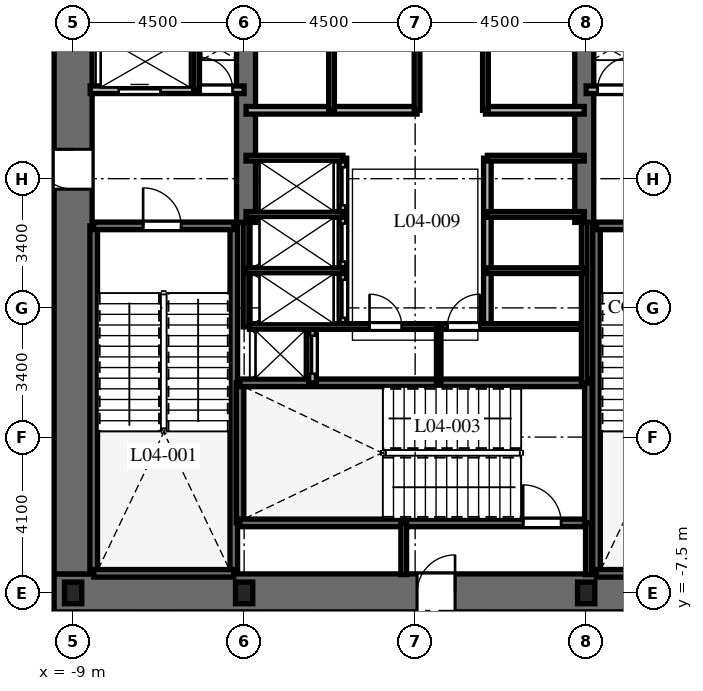
"""IFC4 building model, lengths in metres.
Left out: names, types, materials, properties, quantities, classifications, styles, units other than length and angle.
Written with IfcOpenShell. Run it as: python <this file> out.ifc"""

import sys

from ifc_helpers import new_model, si_unit, direction, frame, frame_2d, origin, origin_2d, place, context, subcontext, project, spatial, rectangle, i_section, extrude, element, fill, save


model = new_model("IFC4")
c1 = context("Model", 3, precision=1e-05, world=origin(), true_north=direction((0.0, 1.0)))
c2 = subcontext(c1, "Body", "Model", "MODEL_VIEW")
j1 = project(units=[si_unit("LENGTHUNIT", "METRE"), si_unit("PLANEANGLEUNIT", "RADIAN")], contexts=[c1])
p1 = place(None, origin())
s1 = spatial("IfcSite", under=j1, at=p1, CompositionType="ELEMENT")
p2 = place(p1, origin())
s2 = spatial("IfcBuilding", under=s1, at=p2, CompositionType="ELEMENT")
p3 = place(p2, frame((0.0, 0.0, 23.4)))
s3 = spatial("IfcBuildingStorey", under=s2, at=p3, CompositionType="ELEMENT", Elevation=23.4)
p4 = place(p3, frame((-9.5, -7.5, 0.0), z_axis=(0.0, 0.0, 1.0), x_axis=(1.0, 0.0, 0.0)))
e1 = element("IfcWall", 1, at=p4, inside=s3, PredefinedType="SHEAR", context=c2, shape_type="SweptSolid", body=[
    extrude(rectangle(XDim=19.0, YDim=1.0, at=frame_2d((9.5, 0.0))), origin(), (0.0, 0.0, 1.0), 4.8),
])
p5 = place(p4, frame((9.55, 0.0, 0.0)))
e2 = element("IfcOpeningElement", 2, at=p5, cuts=e1, PredefinedType="OPENING", context=c2, shape_type="SweptSolid", body=[
    extrude(rectangle(XDim=1.0, YDim=2.15, at=frame_2d((0.5, 1.075))), frame((0.0, 0.51, 0.0), z_axis=(0.0, -1.0, 0.0), x_axis=(1.0, 0.0, 0.0)), (0.0, 0.0, 1.0), 1.02),
])
p6 = place(p3, frame((-9.0, -7.0, 0.0), z_axis=(0.0, 0.0, 1.0), x_axis=(0.0, 1.0, 0.0)))
e3 = element("IfcWall", 3, at=p6, inside=s3, PredefinedType="SHEAR", context=c2, shape_type="SweptSolid", body=[
    extrude(rectangle(XDim=14.0, YDim=1.0, at=frame_2d((7.0, 0.0))), origin(), (0.0, 0.0, 1.0), 4.8),
])
p7 = place(p6, frame((10.125, 0.0, 0.0)))
e4 = element("IfcOpeningElement", 4, at=p7, cuts=e3, PredefinedType="OPENING", context=c2, shape_type="SweptSolid", body=[
    extrude(rectangle(XDim=1.05, YDim=2.15, at=frame_2d((0.525, 1.075))), frame((0.0, 0.51, 0.0), z_axis=(0.0, -1.0, 0.0), x_axis=(1.0, 0.0, 0.0)), (0.0, 0.0, 1.0), 1.02),
])
for number, where, z_axis, x_axis in (
    (5, (-4.45, 2.25, 0.0), (0.0, 0.0, 1.0), (0.0, 1.0, 0.0)),
    (6, (4.45, 2.25, 0.0), (0.0, 0.0, 1.0), (0.0, 1.0, 0.0)),
):
    element("IfcWall", number, at=place(p3, frame(where, z_axis=z_axis, x_axis=x_axis)), inside=s3, PredefinedType="SHEAR", context=c2, shape_type="SweptSolid", body=[
        extrude(rectangle(XDim=4.75, YDim=0.5, at=frame_2d((2.375, 0.0))), origin(), (0.0, 0.0, 1.0), 4.8),
    ])
for number, where, z_axis, x_axis in (
    (7, (-8.458, -6.985, 0.0), (0.0, 0.0, 1.0), (0.0, 1.0, 0.0)),
    (8, (-4.772, -6.985, 0.0), (0.0, 0.0, 1.0), (0.0, 1.0, 0.0)),
):
    element("IfcWall", number, at=place(p3, frame(where, z_axis=z_axis, x_axis=x_axis)), inside=s3, PredefinedType="SHEAR", context=c2, shape_type="SweptSolid", body=[
        extrude(rectangle(XDim=9.143, YDim=0.2, at=frame_2d((4.572, 0.0))), origin(), (0.0, 0.0, 1.0), 4.8),
    ])
p8 = place(p3, frame((-8.458, -6.985, 0.0), z_axis=(0.0, 0.0, 1.0), x_axis=(1.0, 0.0, 0.0)))
e9 = element("IfcWall", 9, at=p8, inside=s3, PredefinedType="SHEAR", context=c2, shape_type="SweptSolid", body=[
    extrude(rectangle(XDim=3.686, YDim=0.2, at=frame_2d((1.843, 0.0))), origin(), (0.0, 0.0, 1.0), 4.8),
])
p9 = place(p3, frame((-8.458, 2.158, 0.0), z_axis=(0.0, 0.0, 1.0), x_axis=(1.0, 0.0, 0.0)))
e10 = element("IfcWall", 10, at=p9, inside=s3, PredefinedType="SHEAR", context=c2, shape_type="SweptSolid", body=[
    extrude(rectangle(XDim=3.686, YDim=0.2, at=frame_2d((1.843, 0.0))), origin(), (0.0, 0.0, 1.0), 4.8),
])
p10 = place(p9, frame((1.3, 0.0, 0.0)))
e11 = element("IfcOpeningElement", 11, at=p10, cuts=e10, PredefinedType="OPENING", context=c2, shape_type="SweptSolid", body=[
    extrude(rectangle(XDim=1.0, YDim=2.15, at=frame_2d((0.5, 1.075))), frame((0.0, 0.11, 0.0), z_axis=(0.0, -1.0, 0.0), x_axis=(1.0, 0.0, 0.0)), (0.0, 0.0, 1.0), 0.22),
])
p11 = place(p3, frame((4.772, -6.985, 0.0), z_axis=(0.0, 0.0, 1.0), x_axis=(0.0, 1.0, 0.0)))
e12 = element("IfcWall", 12, at=p11, inside=s3, PredefinedType="SHEAR", context=c2, shape_type="SweptSolid", body=[
    extrude(rectangle(XDim=9.143, YDim=0.2, at=frame_2d((4.572, 0.0))), origin(), (0.0, 0.0, 1.0), 4.8),
])
p12 = place(p3, frame((4.772, -6.985, 0.0), z_axis=(0.0, 0.0, 1.0), x_axis=(1.0, 0.0, 0.0)))
e13 = element("IfcWall", 13, at=p12, inside=s3, PredefinedType="SHEAR", context=c2, shape_type="SweptSolid", body=[
    extrude(rectangle(XDim=3.686, YDim=0.2, at=frame_2d((1.843, 0.0))), origin(), (0.0, 0.0, 1.0), 4.8),
])
p13 = place(p3, frame((4.772, 2.158, 0.0), z_axis=(0.0, 0.0, 1.0), x_axis=(1.0, 0.0, 0.0)))
e14 = element("IfcWall", 14, at=p13, inside=s3, PredefinedType="SHEAR", context=c2, shape_type="SweptSolid", body=[
    extrude(rectangle(XDim=3.686, YDim=0.2, at=frame_2d((1.843, 0.0))), origin(), (0.0, 0.0, 1.0), 4.8),
])
p14 = place(p13, frame((1.35, 0.0, 0.0)))
e15 = element("IfcOpeningElement", 15, at=p14, cuts=e14, PredefinedType="OPENING", context=c2, shape_type="SweptSolid", body=[
    extrude(rectangle(XDim=1.0, YDim=2.15, at=frame_2d((0.5, 1.075))), frame((0.0, 0.11, 0.0), z_axis=(0.0, -1.0, 0.0), x_axis=(1.0, 0.0, 0.0)), (0.0, 0.0, 1.0), 0.22),
])
p15 = place(p3, frame((-4.608, -5.658, 0.0), z_axis=(0.0, 0.0, 1.0), x_axis=(0.0, 1.0, 0.0)))
e16 = element("IfcWall", 16, at=p15, inside=s3, PredefinedType="SHEAR", context=c2, shape_type="SweptSolid", body=[
    extrude(rectangle(XDim=3.686, YDim=0.2, at=frame_2d((1.843, 0.0))), origin(), (0.0, 0.0, 1.0), 4.8),
])
p16 = place(p3, frame((-4.608, -5.658, 0.0), z_axis=(0.0, 0.0, 1.0), x_axis=(1.0, 0.0, 0.0)))
e17 = element("IfcWall", 17, at=p16, inside=s3, PredefinedType="SHEAR", context=c2, shape_type="SweptSolid", body=[
    extrude(rectangle(XDim=9.166, YDim=0.2, at=frame_2d((4.583, 0.0))), origin(), (0.0, 0.0, 1.0), 4.8),
])
p17 = place(p16, frame((7.45, 0.0, 0.0)))
e18 = element("IfcOpeningElement", 18, at=p17, cuts=e17, PredefinedType="OPENING", context=c2, shape_type="SweptSolid", body=[
    extrude(rectangle(XDim=1.0, YDim=2.15, at=frame_2d((0.5, 1.075))), frame((0.0, 0.11, 0.0), z_axis=(0.0, -1.0, 0.0), x_axis=(1.0, 0.0, 0.0)), (0.0, 0.0, 1.0), 0.22),
])
p18 = place(p3, frame((-4.608, -1.972, 0.0), z_axis=(0.0, 0.0, 1.0), x_axis=(1.0, 0.0, 0.0)))
e19 = element("IfcWall", 19, at=p18, inside=s3, PredefinedType="SHEAR", context=c2, shape_type="SweptSolid", body=[
    extrude(rectangle(XDim=9.166, YDim=0.2, at=frame_2d((4.583, 0.0))), origin(), (0.0, 0.0, 1.0), 4.8),
])
p19 = place(p3, frame((4.558, -5.658, 0.0), z_axis=(0.0, 0.0, 1.0), x_axis=(0.0, 1.0, 0.0)))
e20 = element("IfcWall", 20, at=p19, inside=s3, PredefinedType="SHEAR", context=c2, shape_type="SweptSolid", body=[
    extrude(rectangle(XDim=3.686, YDim=0.2, at=frame_2d((1.843, 0.0))), origin(), (0.0, 0.0, 1.0), 4.8),
])
for number, where, z_axis, x_axis in (
    (21, (-9.0, -7.5, 0.0), (0.0, 0.0, 1.0), (1.0, 0.0, 0.0)),
    (22, (-4.5, -7.5, 0.0), (0.0, 0.0, 1.0), (1.0, 0.0, 0.0)),
    (23, (4.5, -7.5, 0.0), (0.0, 0.0, 1.0), (1.0, 0.0, 0.0)),
):
    element("IfcColumn", number, at=place(p3, frame(where, z_axis=z_axis, x_axis=x_axis)), inside=s3, PredefinedType="COLUMN", context=c2, shape_type="SweptSolid", body=[
        extrude(i_section(OverallWidth=0.454, OverallDepth=0.569, WebThickness=0.078, FlangeThickness=0.125, at=origin_2d()), origin(), (0.0, 0.0, 1.0), 4.8),
    ])
for number, where, z_axis, x_axis in (
    (24, (-0.3, -7.02, 0.0), (0.0, 0.0, 1.0), (0.0, 1.0, 0.0)),
    (25, (4.558, -7.02, 0.0), (0.0, 0.0, 1.0), (0.0, 1.0, 0.0)),
):
    element("IfcWall", number, at=place(p3, frame(where, z_axis=z_axis, x_axis=x_axis)), inside=s3, PredefinedType="PARTITIONING", context=c2, shape_type="SweptSolid", body=[
        extrude(rectangle(XDim=1.362, YDim=0.15, at=frame_2d((0.681, 0.0))), origin(), (0.0, 0.0, 1.0), 4.48),
    ])
p20 = place(p3, frame((-8.55, 5.74, 0.0), z_axis=(0.0, 0.0, 1.0), x_axis=(1.0, 0.0, 0.0)))
e26 = element("IfcWall", 26, at=p20, inside=s3, PredefinedType="PARTITIONING", context=c2, shape_type="SweptSolid", body=[
    extrude(rectangle(XDim=4.05, YDim=0.2, at=frame_2d((2.025, 0.0))), origin(), (0.0, 0.0, 1.0), 4.48),
])
p21 = place(p20, frame((0.75, 0.0, 0.0)))
e27 = element("IfcOpeningElement", 27, at=p21, cuts=e26, PredefinedType="OPENING", context=c2, shape_type="SweptSolid", body=[
    extrude(rectangle(XDim=1.1, YDim=2.2, at=frame_2d((0.55, 1.1))), frame((0.0, 0.11, 0.0), z_axis=(0.0, -1.0, 0.0), x_axis=(1.0, 0.0, 0.0)), (0.0, 0.0, 1.0), 0.22),
])
p22 = place(p20, frame((2.9, 0.0, 0.0)))
e28 = element("IfcOpeningElement", 28, at=p22, cuts=e26, PredefinedType="OPENING", context=c2, shape_type="SweptSolid", body=[
    extrude(rectangle(XDim=0.85, YDim=2.03, at=frame_2d((0.425, 1.015))), frame((0.0, 0.11, 0.0), z_axis=(0.0, -1.0, 0.0), x_axis=(1.0, 0.0, 0.0)), (0.0, 0.0, 1.0), 0.22),
])
p23 = place(p3, frame((-5.75, 5.74, 0.0), z_axis=(0.0, 0.0, 1.0), x_axis=(0.0, 1.0, 0.0)))
e29 = element("IfcWall", 29, at=p23, inside=s3, PredefinedType="PARTITIONING", context=c2, shape_type="SweptSolid", body=[
    extrude(rectangle(XDim=1.41, YDim=0.15, at=frame_2d((0.705, 0.0))), origin(), (0.0, 0.0, 1.0), 4.48),
])
p24 = place(p3, frame((4.5, 5.74, 0.0), z_axis=(0.0, 0.0, 1.0), x_axis=(1.0, 0.0, 0.0)))
e30 = element("IfcWall", 30, at=p24, inside=s3, PredefinedType="PARTITIONING", context=c2, shape_type="SweptSolid", body=[
    extrude(rectangle(XDim=4.05, YDim=0.2, at=frame_2d((2.025, 0.0))), origin(), (0.0, 0.0, 1.0), 4.48),
])
p25 = place(p24, frame((0.3, 0.0, 0.0)))
e31 = element("IfcOpeningElement", 31, at=p25, cuts=e30, PredefinedType="OPENING", context=c2, shape_type="SweptSolid", body=[
    extrude(rectangle(XDim=0.85, YDim=2.03, at=frame_2d((0.425, 1.015))), frame((0.0, 0.11, 0.0), z_axis=(0.0, -1.0, 0.0), x_axis=(1.0, 0.0, 0.0)), (0.0, 0.0, 1.0), 0.22),
])
p26 = place(p24, frame((2.15, 0.0, 0.0)))
e32 = element("IfcOpeningElement", 32, at=p26, cuts=e30, PredefinedType="OPENING", context=c2, shape_type="SweptSolid", body=[
    extrude(rectangle(XDim=1.1, YDim=2.2, at=frame_2d((0.55, 1.1))), frame((0.0, 0.11, 0.0), z_axis=(0.0, -1.0, 0.0), x_axis=(1.0, 0.0, 0.0)), (0.0, 0.0, 1.0), 0.22),
])
p27 = place(p3, frame((-2.7, -1.972, 0.0), z_axis=(0.0, 0.0, 1.0), x_axis=(0.0, 1.0, 0.0)))
e33 = element("IfcWall", 33, at=p27, inside=s3, PredefinedType="PARTITIONING", context=c2, shape_type="SweptSolid", body=[
    extrude(rectangle(XDim=1.472, YDim=0.2, at=frame_2d((0.736, 0.0))), origin(), (0.0, 0.0, 1.0), 4.48),
])
p28 = place(p27, frame((0.24, 0.0, 0.0)))
e34 = element("IfcOpeningElement", 34, at=p28, cuts=e33, PredefinedType="OPENING", context=c2, shape_type="SweptSolid", body=[
    extrude(rectangle(XDim=1.0, YDim=2.2, at=frame_2d((0.5, 1.1))), frame((0.0, 0.11, 0.0), z_axis=(0.0, -1.0, 0.0), x_axis=(1.0, 0.0, 0.0)), (0.0, 0.0, 1.0), 0.22),
])
p29 = place(p3, frame((-4.45, 5.2, 0.0), z_axis=(0.0, 0.0, 1.0), x_axis=(1.0, 0.0, 0.0)))
e35 = element("IfcWall", 35, at=p29, inside=s3, PredefinedType="PARTITIONING", context=c2, shape_type="SweptSolid", body=[
    extrude(rectangle(XDim=4.5, YDim=0.2, at=frame_2d((2.25, 0.0))), origin(), (0.0, 0.0, 1.0), 4.48),
])
p30 = place(p3, frame((1.85, 5.2, 0.0), z_axis=(0.0, 0.0, 1.0), x_axis=(1.0, 0.0, 0.0)))
e36 = element("IfcWall", 36, at=p30, inside=s3, PredefinedType="PARTITIONING", context=c2, shape_type="SweptSolid", body=[
    extrude(rectangle(XDim=2.6, YDim=0.2, at=frame_2d((1.3, 0.0))), origin(), (0.0, 0.0, 1.0), 4.48),
])
p31 = place(p3, frame((-2.2, 5.2, 0.0), z_axis=(0.0, 0.0, 1.0), x_axis=(0.0, 1.0, 0.0)))
e37 = element("IfcWall", 37, at=p31, inside=s3, PredefinedType="PARTITIONING", context=c2, shape_type="SweptSolid", body=[
    extrude(rectangle(XDim=1.85, YDim=0.15, at=frame_2d((0.925, 0.0))), origin(), (0.0, 0.0, 1.0), 4.48),
])
for number, where, z_axis, x_axis in (
    (38, (0.05, 5.2, 0.0), (0.0, 0.0, 1.0), (0.0, 1.0, 0.0)),
    (39, (1.85, 5.2, 0.0), (0.0, 0.0, 1.0), (0.0, 1.0, 0.0)),
):
    element("IfcWall", number, at=place(p3, frame(where, z_axis=z_axis, x_axis=x_axis)), inside=s3, PredefinedType="PARTITIONING", context=c2, shape_type="SweptSolid", body=[
        extrude(rectangle(XDim=1.95, YDim=0.15, at=frame_2d((0.975, 0.0))), origin(), (0.0, 0.0, 1.0), 4.48),
    ])
p32 = place(p3, frame((-4.45, -0.5, 0.0), z_axis=(0.0, 0.0, 1.0), x_axis=(0.0, 1.0, 0.0)))
e40 = element("IfcWall", 40, at=p32, inside=s3, PredefinedType="PARTITIONING", context=c2, shape_type="SweptSolid", body=[
    extrude(rectangle(XDim=2.75, YDim=0.15, at=frame_2d((1.375, 0.0))), origin(), (0.0, 0.0, 1.0), 4.48),
])
p33 = place(p3, frame((4.45, -1.972, 0.0), z_axis=(0.0, 0.0, 1.0), x_axis=(0.0, 1.0, 0.0)))
e41 = element("IfcWall", 41, at=p33, inside=s3, PredefinedType="PARTITIONING", context=c2, shape_type="SweptSolid", body=[
    extrude(rectangle(XDim=4.222, YDim=0.15, at=frame_2d((2.111, 0.0))), origin(), (0.0, 0.0, 1.0), 4.48),
])
p34 = place(p3, frame((-1.9, -0.5, 0.0), z_axis=(0.0, 0.0, 1.0), x_axis=(0.0, 1.0, 0.0)))
e42 = element("IfcWall", 42, at=p34, inside=s3, PredefinedType="PARTITIONING", context=c2, shape_type="SweptSolid", body=[
    extrude(rectangle(XDim=4.44, YDim=0.2, at=frame_2d((2.22, 0.0))), origin(), (0.0, 0.0, 1.0), 4.48),
])
p35 = place(p34, frame((0.24, 0.0, 0.0)))
e43 = element("IfcOpeningElement", 43, at=p35, cuts=e42, PredefinedType="OPENING", context=c2, shape_type="SweptSolid", body=[
    extrude(rectangle(XDim=1.0, YDim=2.2, at=frame_2d((0.5, 1.1))), frame((0.0, 0.11, 0.0), z_axis=(0.0, -1.0, 0.0), x_axis=(1.0, 0.0, 0.0)), (0.0, 0.0, 1.0), 0.22),
])
p36 = place(p34, frame((1.72, 0.0, 0.0)))
e44 = element("IfcOpeningElement", 44, at=p36, cuts=e42, PredefinedType="OPENING", context=c2, shape_type="SweptSolid", body=[
    extrude(rectangle(XDim=1.0, YDim=2.2, at=frame_2d((0.5, 1.1))), frame((0.0, 0.11, 0.0), z_axis=(0.0, -1.0, 0.0), x_axis=(1.0, 0.0, 0.0)), (0.0, 0.0, 1.0), 0.22),
])
p37 = place(p34, frame((3.2, 0.0, 0.0)))
e45 = element("IfcOpeningElement", 45, at=p37, cuts=e42, PredefinedType="OPENING", context=c2, shape_type="SweptSolid", body=[
    extrude(rectangle(XDim=1.0, YDim=2.2, at=frame_2d((0.5, 1.1))), frame((0.0, 0.11, 0.0), z_axis=(0.0, -1.0, 0.0), x_axis=(1.0, 0.0, 0.0)), (0.0, 0.0, 1.0), 0.22),
])
for number, where, z_axis, x_axis in (
    (46, (-4.45, 3.94, 0.0), (0.0, 0.0, 1.0), (1.0, 0.0, 0.0)),
    (47, (-4.45, 0.98, 0.0), (0.0, 0.0, 1.0), (1.0, 0.0, 0.0)),
    (48, (-4.45, 2.46, 0.0), (0.0, 0.0, 1.0), (1.0, 0.0, 0.0)),
):
    element("IfcWall", number, at=place(p3, frame(where, z_axis=z_axis, x_axis=x_axis)), inside=s3, PredefinedType="PARTITIONING", context=c2, shape_type="SweptSolid", body=[
        extrude(rectangle(XDim=2.55, YDim=0.15, at=frame_2d((1.275, 0.0))), origin(), (0.0, 0.0, 1.0), 4.48),
    ])
p38 = place(p3, frame((1.9, -0.5, 0.0), z_axis=(0.0, 0.0, 1.0), x_axis=(0.0, 1.0, 0.0)))
e49 = element("IfcWall", 49, at=p38, inside=s3, PredefinedType="PARTITIONING", context=c2, shape_type="SweptSolid", body=[
    extrude(rectangle(XDim=4.44, YDim=0.2, at=frame_2d((2.22, 0.0))), origin(), (0.0, 0.0, 1.0), 4.48),
])
for number, where, z_axis, x_axis in (
    (50, (1.9, 3.94, 0.0), (0.0, 0.0, 1.0), (1.0, 0.0, 0.0)),
    (51, (1.9, 0.98, 0.0), (0.0, 0.0, 1.0), (1.0, 0.0, 0.0)),
    (52, (1.9, 2.46, 0.0), (0.0, 0.0, 1.0), (1.0, 0.0, 0.0)),
):
    element("IfcWall", number, at=place(p3, frame(where, z_axis=z_axis, x_axis=x_axis)), inside=s3, PredefinedType="PARTITIONING", context=c2, shape_type="SweptSolid", body=[
        extrude(rectangle(XDim=2.55, YDim=0.15, at=frame_2d((1.275, 0.0))), origin(), (0.0, 0.0, 1.0), 4.48),
    ])
p39 = place(p3, frame((-4.36, -0.49, 0.0), z_axis=(0.0, 0.0, 1.0), x_axis=(1.0, 0.0, 0.0)))
e53 = element("IfcWall", 53, at=p39, inside=s3, PredefinedType="PARTITIONING", context=c2, shape_type="SweptSolid", body=[
    extrude(rectangle(XDim=8.72, YDim=0.15, at=frame_2d((4.36, 0.0))), origin(), (0.0, 0.0, 1.0), 4.48),
])
p40 = place(p39, frame((3.16, 0.0, 0.0)))
e54 = element("IfcOpeningElement", 54, at=p40, cuts=e53, PredefinedType="OPENING", context=c2, shape_type="SweptSolid", body=[
    extrude(rectangle(XDim=0.85, YDim=2.03, at=frame_2d((0.425, 1.015))), frame((0.0, 0.085, 0.0), z_axis=(0.0, -1.0, 0.0), x_axis=(1.0, 0.0, 0.0)), (0.0, 0.0, 1.0), 0.17),
])
p41 = place(p39, frame((5.21, 0.0, 0.0)))
e55 = element("IfcOpeningElement", 55, at=p41, cuts=e53, PredefinedType="OPENING", context=c2, shape_type="SweptSolid", body=[
    extrude(rectangle(XDim=0.85, YDim=2.03, at=frame_2d((0.425, 1.015))), frame((0.0, 0.085, 0.0), z_axis=(0.0, -1.0, 0.0), x_axis=(1.0, 0.0, 0.0)), (0.0, 0.0, 1.0), 0.17),
])
p42 = place(p3, frame((0.62, -1.972, 0.0), z_axis=(0.0, 0.0, 1.0), x_axis=(0.0, 1.0, 0.0)))
e56 = element("IfcWall", 56, at=p42, inside=s3, PredefinedType="PARTITIONING", context=c2, shape_type="SweptSolid", body=[
    extrude(rectangle(XDim=1.472, YDim=0.12, at=frame_2d((0.736, 0.0))), origin(), (0.0, 0.0, 1.0), 4.48),
])
p43 = place(p10, origin())
e57 = element("IfcDoor", 57, at=p43, inside=s3, OperationType="SINGLE_SWING_LEFT", PredefinedType="DOOR", context=c2, shape_type="SweptSolid", body=[
    extrude(rectangle(XDim=1.0, YDim=2.15, at=frame_2d((0.5, 1.075))), frame((0.0, 0.025, 0.0), z_axis=(0.0, -1.0, 0.0), x_axis=(1.0, 0.0, 0.0)), (0.0, 0.0, 1.0), 0.05),
])
fill(e11, e57)
p44 = place(p17, origin())
e58 = element("IfcDoor", 58, at=p44, inside=s3, OperationType="SINGLE_SWING_LEFT", PredefinedType="DOOR", context=c2, shape_type="SweptSolid", body=[
    extrude(rectangle(XDim=1.0, YDim=2.15, at=frame_2d((0.5, 1.075))), frame((0.0, 0.025, 0.0), z_axis=(0.0, -1.0, 0.0), x_axis=(1.0, 0.0, 0.0)), (0.0, 0.0, 1.0), 0.05),
])
fill(e18, e58)
p45 = place(p5, origin())
e59 = element("IfcDoor", 59, at=p45, inside=s3, OperationType="SINGLE_SWING_RIGHT", PredefinedType="DOOR", context=c2, shape_type="SweptSolid", body=[
    extrude(rectangle(XDim=1.0, YDim=2.15, at=frame_2d((0.5, 1.075))), frame((0.0, 0.025, 0.0), z_axis=(0.0, -1.0, 0.0), x_axis=(1.0, 0.0, 0.0)), (0.0, 0.0, 1.0), 0.05),
])
fill(e2, e59)
p46 = place(p7, origin())
e60 = element("IfcDoor", 60, at=p46, inside=s3, OperationType="SINGLE_SWING_RIGHT", PredefinedType="DOOR", context=c2, shape_type="SweptSolid", body=[
    extrude(rectangle(XDim=1.05, YDim=2.15, at=frame_2d((0.525, 1.075))), frame((0.0, 0.025, 0.0), z_axis=(0.0, -1.0, 0.0), x_axis=(1.0, 0.0, 0.0)), (0.0, 0.0, 1.0), 0.05),
])
fill(e4, e60)
p47 = place(p21, origin())
e61 = element("IfcDoor", 61, at=p47, inside=s3, OperationType="SLIDING_TO_LEFT", PredefinedType="DOOR", context=c2, shape_type="SweptSolid", body=[
    extrude(rectangle(XDim=1.1, YDim=2.2, at=frame_2d((0.55, 1.1))), frame((0.0, 0.025, 0.0), z_axis=(0.0, -1.0, 0.0), x_axis=(1.0, 0.0, 0.0)), (0.0, 0.0, 1.0), 0.05),
])
fill(e27, e61)
p48 = place(p22, origin())
e62 = element("IfcDoor", 62, at=p48, inside=s3, OperationType="SINGLE_SWING_LEFT", PredefinedType="DOOR", context=c2, shape_type="SweptSolid", body=[
    extrude(rectangle(XDim=0.85, YDim=2.03, at=frame_2d((0.425, 1.015))), frame((0.0, 0.025, 0.0), z_axis=(0.0, -1.0, 0.0), x_axis=(1.0, 0.0, 0.0)), (0.0, 0.0, 1.0), 0.05),
])
fill(e28, e62)
p49 = place(p25, origin())
e63 = element("IfcDoor", 63, at=p49, inside=s3, OperationType="SINGLE_SWING_RIGHT", PredefinedType="DOOR", context=c2, shape_type="SweptSolid", body=[
    extrude(rectangle(XDim=0.85, YDim=2.03, at=frame_2d((0.425, 1.015))), frame((0.0, 0.025, 0.0), z_axis=(0.0, -1.0, 0.0), x_axis=(1.0, 0.0, 0.0)), (0.0, 0.0, 1.0), 0.05),
])
fill(e31, e63)
p50 = place(p28, origin())
e64 = element("IfcDoor", 64, at=p50, inside=s3, OperationType="SLIDING_TO_LEFT", PredefinedType="DOOR", context=c2, shape_type="SweptSolid", body=[
    extrude(rectangle(XDim=1.0, YDim=2.2, at=frame_2d((0.5, 1.1))), frame((0.0, 0.025, 0.0), z_axis=(0.0, -1.0, 0.0), x_axis=(1.0, 0.0, 0.0)), (0.0, 0.0, 1.0), 0.05),
])
fill(e34, e64)
p51 = place(p35, origin())
e65 = element("IfcDoor", 65, at=p51, inside=s3, OperationType="SLIDING_TO_LEFT", PredefinedType="DOOR", context=c2, shape_type="SweptSolid", body=[
    extrude(rectangle(XDim=1.0, YDim=2.2, at=frame_2d((0.5, 1.1))), frame((0.0, 0.025, 0.0), z_axis=(0.0, -1.0, 0.0), x_axis=(1.0, 0.0, 0.0)), (0.0, 0.0, 1.0), 0.05),
])
fill(e43, e65)
p52 = place(p36, origin())
e66 = element("IfcDoor", 66, at=p52, inside=s3, OperationType="SLIDING_TO_LEFT", PredefinedType="DOOR", context=c2, shape_type="SweptSolid", body=[
    extrude(rectangle(XDim=1.0, YDim=2.2, at=frame_2d((0.5, 1.1))), frame((0.0, 0.025, 0.0), z_axis=(0.0, -1.0, 0.0), x_axis=(1.0, 0.0, 0.0)), (0.0, 0.0, 1.0), 0.05),
])
fill(e44, e66)
p53 = place(p37, origin())
e67 = element("IfcDoor", 67, at=p53, inside=s3, OperationType="SLIDING_TO_LEFT", PredefinedType="DOOR", context=c2, shape_type="SweptSolid", body=[
    extrude(rectangle(XDim=1.0, YDim=2.2, at=frame_2d((0.5, 1.1))), frame((0.0, 0.025, 0.0), z_axis=(0.0, -1.0, 0.0), x_axis=(1.0, 0.0, 0.0)), (0.0, 0.0, 1.0), 0.05),
])
fill(e45, e67)
p54 = place(p40, origin())
e68 = element("IfcDoor", 68, at=p54, inside=s3, OperationType="SINGLE_SWING_LEFT", PredefinedType="DOOR", context=c2, shape_type="SweptSolid", body=[
    extrude(rectangle(XDim=0.85, YDim=2.03, at=frame_2d((0.425, 1.015))), frame((0.0, 0.025, 0.0), z_axis=(0.0, -1.0, 0.0), x_axis=(1.0, 0.0, 0.0)), (0.0, 0.0, 1.0), 0.05),
])
fill(e54, e68)
p55 = place(p41, origin())
e69 = element("IfcDoor", 69, at=p55, inside=s3, OperationType="SINGLE_SWING_RIGHT", PredefinedType="DOOR", context=c2, shape_type="SweptSolid", body=[
    extrude(rectangle(XDim=0.85, YDim=2.03, at=frame_2d((0.425, 1.015))), frame((0.0, 0.025, 0.0), z_axis=(0.0, -1.0, 0.0), x_axis=(1.0, 0.0, 0.0)), (0.0, 0.0, 1.0), 0.05),
])
fill(e55, e69)
save(model, sys.argv[1])
